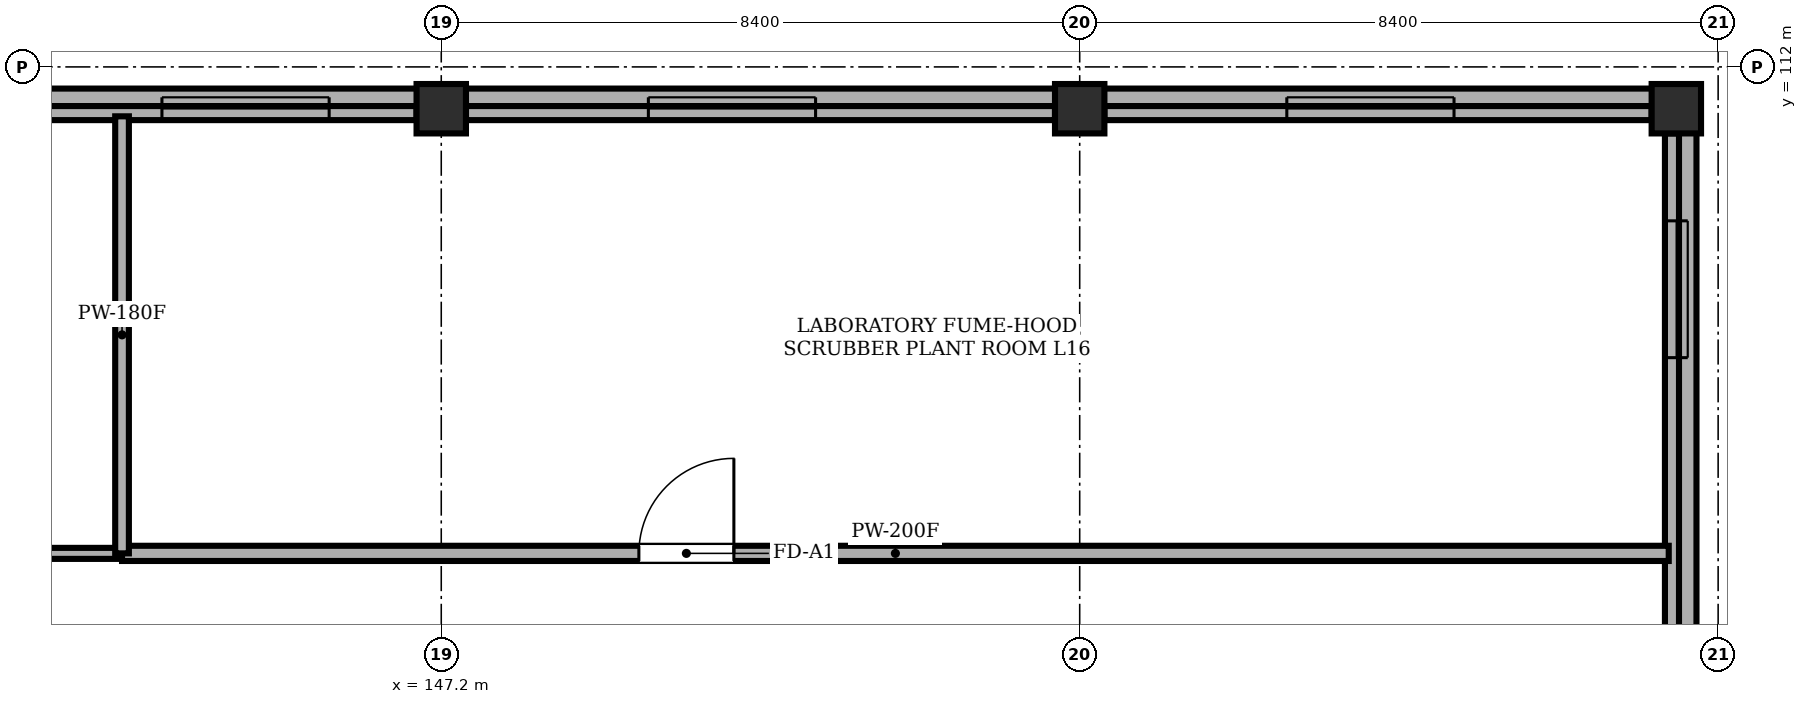
"""IFC4 building model, lengths in metres.
Left out: names, types, materials, properties, quantities, classifications, styles, units other than length and angle.
Written with IfcOpenShell. Run it as: python <this file> out.ifc"""

import sys

from ifc_helpers import new_model, si_unit, direction, frame, frame_2d, origin, origin_2d, place, context, subcontext, project, spatial, rectangle, extrude, element, fill, save


model = new_model("IFC4")
c1 = context("Model", 3, precision=1e-05, world=origin(), true_north=direction((0.0, 1.0)))
c2 = subcontext(c1, "Body", "Model", "MODEL_VIEW")
j1 = project(units=[si_unit("LENGTHUNIT", "METRE"), si_unit("PLANEANGLEUNIT", "RADIAN")], contexts=[c1])
p1 = place(None, origin())
s1 = spatial("IfcSite", under=j1, at=p1, CompositionType="ELEMENT")
p2 = place(p1, origin())
s2 = spatial("IfcBuilding", under=s1, at=p2, CompositionType="ELEMENT")
p3 = place(p2, frame((0.0, 0.0, 65.7)))
s3 = spatial("IfcBuildingStorey", under=s2, at=p3, CompositionType="ELEMENT", Elevation=65.7)
for number, where, z_axis, x_axis in (
    (1, (147.2, 111.45, 0.0), (0.0, 0.0, 1.0), (1.0, 0.0, 0.0)),
    (2, (155.6, 111.45, 0.0), (0.0, 0.0, 1.0), (1.0, 0.0, 0.0)),
    (3, (163.45, 111.45, 0.0), (0.0, 0.0, 1.0), (1.0, 0.0, 0.0)),
):
    element("IfcColumn", number, at=place(p3, frame(where, z_axis=z_axis, x_axis=x_axis)), inside=s3, PredefinedType="COLUMN", context=c2, shape_type="SweptSolid", body=[
        extrude(rectangle(XDim=0.65, YDim=0.65, at=origin_2d()), origin(), (0.0, 0.0, 1.0), 4.3),
    ])
p4 = place(p3, frame((139.125, 111.45, 0.0), z_axis=(0.0, 0.0, 1.0), x_axis=(1.0, 0.0, 0.0)))
e4 = element("IfcWall", 4, at=p4, inside=s3, PredefinedType="STANDARD", context=c2, shape_type="SweptSolid", body=[
    extrude(rectangle(XDim=7.75, YDim=0.3, at=frame_2d((3.875, 0.0))), origin(), (0.0, 0.0, 1.0), 3.7),
])
p5 = place(p4, frame((4.4, 0.0, 1.3)))
e5 = element("IfcOpeningElement", 5, at=p5, cuts=e4, PredefinedType="OPENING", context=c2, shape_type="SweptSolid", body=[
    extrude(rectangle(XDim=2.2, YDim=1.2, at=frame_2d((1.1, 0.6))), frame((0.0, 0.16, 0.0), z_axis=(0.0, -1.0, 0.0), x_axis=(1.0, 0.0, 0.0)), (0.0, 0.0, 1.0), 0.32),
])
p6 = place(p3, frame((147.525, 111.45, 0.0), z_axis=(0.0, 0.0, 1.0), x_axis=(1.0, 0.0, 0.0)))
e6 = element("IfcWall", 6, at=p6, inside=s3, PredefinedType="STANDARD", context=c2, shape_type="SweptSolid", body=[
    extrude(rectangle(XDim=7.75, YDim=0.3, at=frame_2d((3.875, 0.0))), origin(), (0.0, 0.0, 1.0), 3.7),
])
p7 = place(p6, frame((2.4, 0.0, 1.3)))
e7 = element("IfcOpeningElement", 7, at=p7, cuts=e6, PredefinedType="OPENING", context=c2, shape_type="SweptSolid", body=[
    extrude(rectangle(XDim=2.2, YDim=1.2, at=frame_2d((1.1, 0.6))), frame((0.0, 0.16, 0.0), z_axis=(0.0, -1.0, 0.0), x_axis=(1.0, 0.0, 0.0)), (0.0, 0.0, 1.0), 0.32),
])
p8 = place(p3, frame((155.925, 111.45, 0.0), z_axis=(0.0, 0.0, 1.0), x_axis=(1.0, 0.0, 0.0)))
e8 = element("IfcWall", 8, at=p8, inside=s3, PredefinedType="STANDARD", context=c2, shape_type="SweptSolid", body=[
    extrude(rectangle(XDim=7.2, YDim=0.3, at=frame_2d((3.6, 0.0))), origin(), (0.0, 0.0, 1.0), 3.7),
])
p9 = place(p8, frame((2.4, 0.0, 1.3)))
e9 = element("IfcOpeningElement", 9, at=p9, cuts=e8, PredefinedType="OPENING", context=c2, shape_type="SweptSolid", body=[
    extrude(rectangle(XDim=2.2, YDim=1.2, at=frame_2d((1.1, 0.6))), frame((0.0, 0.16, 0.0), z_axis=(0.0, -1.0, 0.0), x_axis=(1.0, 0.0, 0.0)), (0.0, 0.0, 1.0), 0.32),
])
p10 = place(p3, frame((163.45, 111.125, 0.0), z_axis=(0.0, 0.0, 1.0), x_axis=(0.0, -1.0, 0.0)))
e10 = element("IfcWall", 10, at=p10, inside=s3, PredefinedType="STANDARD", context=c2, shape_type="SweptSolid", body=[
    extrude(rectangle(XDim=7.2, YDim=0.3, at=frame_2d((3.6, 0.0))), origin(), (0.0, 0.0, 1.0), 3.7),
])
p11 = place(p10, frame((1.15, 0.0, 1.1)))
e11 = element("IfcOpeningElement", 11, at=p11, cuts=e10, PredefinedType="OPENING", context=c2, shape_type="SweptSolid", body=[
    extrude(rectangle(XDim=1.8, YDim=1.8, at=frame_2d((0.9, 0.9))), frame((0.0, 0.16, 0.0), z_axis=(0.0, -1.0, 0.0), x_axis=(1.0, 0.0, 0.0)), (0.0, 0.0, 1.0), 0.32),
])
p12 = place(p3, frame((163.6, 78.515, 4.5), z_axis=(0.0, 0.0, 1.0), x_axis=(0.0, 1.0, 0.0)))
e12 = element("IfcWall", 12, at=p12, inside=s3, PredefinedType="PARAPET", context=c2, shape_type="SweptSolid", body=[
    extrude(rectangle(XDim=32.97, YDim=0.23, at=frame_2d((16.485, 0.0))), origin(), (0.0, 0.0, 1.0), 1.35),
])
p13 = place(p3, frame((163.715, 111.6, 4.5), z_axis=(0.0, 0.0, 1.0), x_axis=(-1.0, 0.0, 0.0)))
e13 = element("IfcWall", 13, at=p13, inside=s3, PredefinedType="PARAPET", context=c2, shape_type="SweptSolid", body=[
    extrude(rectangle(XDim=41.83, YDim=0.23, at=frame_2d((20.915, 0.0))), origin(), (0.0, 0.0, 1.0), 1.35),
])
p14 = place(p3, frame((122.15, 105.6, 0.0), z_axis=(0.0, 0.0, 1.0), x_axis=(1.0, 0.0, 0.0)))
e14 = element("IfcWall", 14, at=p14, inside=s3, PredefinedType="PARTITIONING", context=c2, shape_type="SweptSolid", body=[
    extrude(rectangle(XDim=20.85, YDim=0.145, at=frame_2d((10.425, 0.0))), origin(), (0.0, 0.0, 1.0), 4.3),
])
p15 = place(p14, frame((3.75, 0.0, 0.0)))
e15 = element("IfcOpeningElement", 15, at=p15, cuts=e14, PredefinedType="OPENING", context=c2, shape_type="SweptSolid", body=[
    extrude(rectangle(XDim=1.2, YDim=2.2, at=frame_2d((0.6, 1.1))), frame((0.0, 0.083, 0.0), z_axis=(0.0, -1.0, 0.0), x_axis=(1.0, 0.0, 0.0)), (0.0, 0.0, 1.0), 0.165),
])
p16 = place(p3, frame((143.0, 105.6, 0.0), z_axis=(0.0, 0.0, 1.0), x_axis=(1.0, 0.0, 0.0)))
e16 = element("IfcWall", 16, at=p16, inside=s3, PredefinedType="SOLIDWALL", context=c2, shape_type="SweptSolid", body=[
    extrude(rectangle(XDim=20.35, YDim=0.2, at=frame_2d((10.175, 0.0))), origin(), (0.0, 0.0, 1.0), 4.3),
])
p17 = place(p16, frame((6.8, 0.0, 0.0)))
e17 = element("IfcOpeningElement", 17, at=p17, cuts=e16, PredefinedType="OPENING", context=c2, shape_type="SweptSolid", body=[
    extrude(rectangle(XDim=1.25, YDim=2.2, at=frame_2d((0.625, 1.1))), frame((0.0, 0.11, 0.0), z_axis=(0.0, -1.0, 0.0), x_axis=(1.0, 0.0, 0.0)), (0.0, 0.0, 1.0), 0.22),
])
p18 = place(p3, frame((143.0, 105.6, 0.0), z_axis=(0.0, 0.0, 1.0), x_axis=(0.0, 1.0, 0.0)))
e18 = element("IfcWall", 18, at=p18, inside=s3, PredefinedType="STANDARD", context=c2, shape_type="SweptSolid", body=[
    extrude(rectangle(XDim=5.75, YDim=0.18, at=frame_2d((2.875, 0.0))), origin(), (0.0, 0.0, 1.0), 3.85),
])
p19 = place(p5, origin())
e19 = element("IfcWindow", 19, at=p19, inside=s3, PartitioningType="DOUBLE_PANEL_HORIZONTAL", PredefinedType="WINDOW", context=c2, shape_type="SweptSolid", body=[
    extrude(rectangle(XDim=2.2, YDim=1.2, at=frame_2d((1.1, 0.6))), frame((0.0, 0.03, 0.0), z_axis=(0.0, -1.0, 0.0), x_axis=(1.0, 0.0, 0.0)), (0.0, 0.0, 1.0), 0.06),
])
fill(e5, e19)
p20 = place(p7, origin())
e20 = element("IfcWindow", 20, at=p20, inside=s3, PartitioningType="DOUBLE_PANEL_HORIZONTAL", PredefinedType="WINDOW", context=c2, shape_type="SweptSolid", body=[
    extrude(rectangle(XDim=2.2, YDim=1.2, at=frame_2d((1.1, 0.6))), frame((0.0, 0.03, 0.0), z_axis=(0.0, -1.0, 0.0), x_axis=(1.0, 0.0, 0.0)), (0.0, 0.0, 1.0), 0.06),
])
fill(e7, e20)
p21 = place(p9, origin())
e21 = element("IfcWindow", 21, at=p21, inside=s3, PartitioningType="DOUBLE_PANEL_HORIZONTAL", PredefinedType="WINDOW", context=c2, shape_type="SweptSolid", body=[
    extrude(rectangle(XDim=2.2, YDim=1.2, at=frame_2d((1.1, 0.6))), frame((0.0, 0.03, 0.0), z_axis=(0.0, -1.0, 0.0), x_axis=(1.0, 0.0, 0.0)), (0.0, 0.0, 1.0), 0.06),
])
fill(e9, e21)
p22 = place(p11, origin())
e22 = element("IfcWindow", 22, at=p22, inside=s3, PartitioningType="DOUBLE_PANEL_VERTICAL", PredefinedType="WINDOW", context=c2, shape_type="SweptSolid", body=[
    extrude(rectangle(XDim=1.8, YDim=1.8, at=frame_2d((0.9, 0.9))), frame((0.0, 0.03, 0.0), z_axis=(0.0, -1.0, 0.0), x_axis=(1.0, 0.0, 0.0)), (0.0, 0.0, 1.0), 0.06),
])
fill(e11, e22)
p23 = place(p17, origin())
e23 = element("IfcDoor", 23, at=p23, inside=s3, OperationType="SINGLE_SWING_RIGHT", PredefinedType="DOOR", context=c2, shape_type="SweptSolid", body=[
    extrude(rectangle(XDim=1.25, YDim=2.2, at=frame_2d((0.625, 1.1))), frame((0.0, 0.025, 0.0), z_axis=(0.0, -1.0, 0.0), x_axis=(1.0, 0.0, 0.0)), (0.0, 0.0, 1.0), 0.05),
])
fill(e17, e23)
save(model, sys.argv[1])
